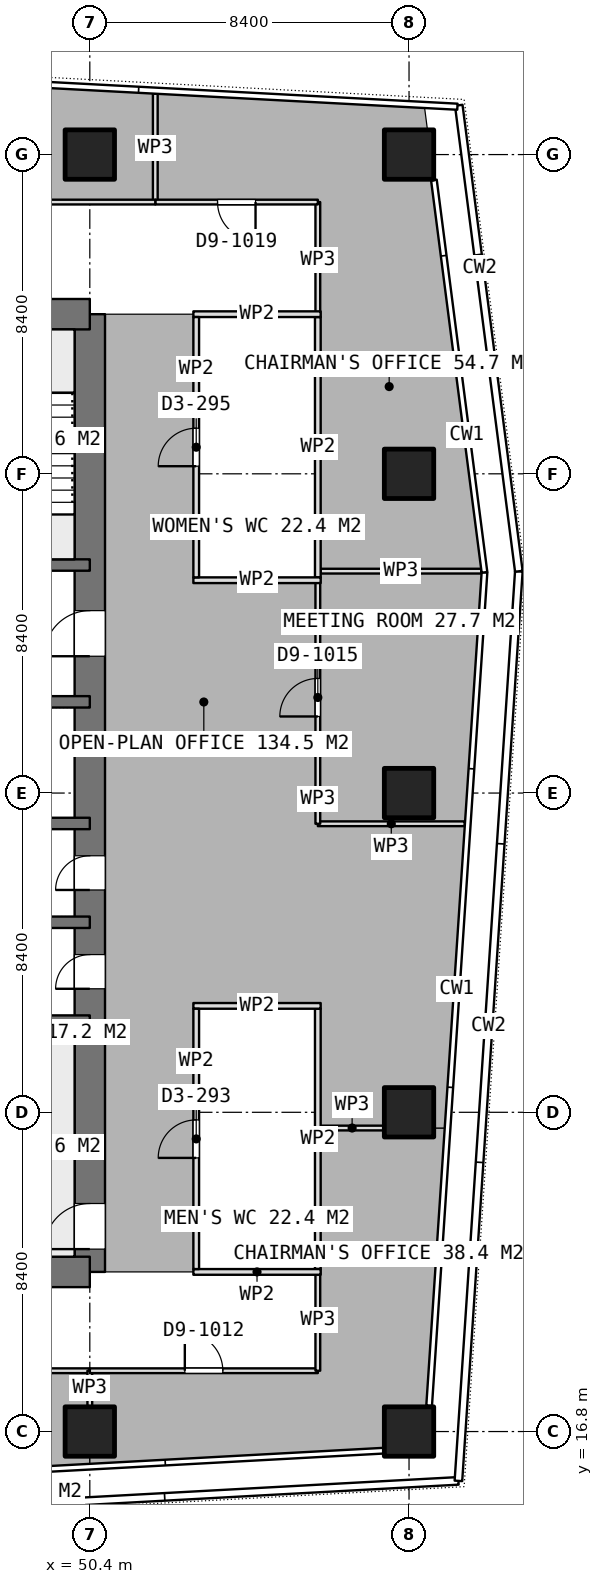
"""IFC4 building model, lengths in metres.
Left out: names, types, materials, properties, quantities, classifications, styles, units other than length and angle.
Written with IfcOpenShell. Run it as: python <this file> out.ifc"""

import sys

from ifc_helpers import new_model, si_unit, direction, frame, frame_2d, origin, origin_2d, place, context, subcontext, project, spatial, rectangle, extrude, element, fill, save


model = new_model("IFC4")
c1 = context("Model", 3, precision=1e-05, world=origin(), true_north=direction((0.0, 1.0)))
c2 = subcontext(c1, "Body", "Model", "MODEL_VIEW")
j1 = project(units=[si_unit("LENGTHUNIT", "METRE"), si_unit("PLANEANGLEUNIT", "RADIAN")], contexts=[c1])
p1 = place(None, origin())
s1 = spatial("IfcSite", under=j1, at=p1, CompositionType="ELEMENT")
p2 = place(p1, origin())
s2 = spatial("IfcBuilding", under=s1, at=p2, CompositionType="ELEMENT")
p3 = place(p2, frame((0.0, 0.0, 272.6)))
s3 = spatial("IfcBuildingStorey", under=s2, at=p3, CompositionType="ELEMENT", Elevation=272.6)
for number, where, z_axis, x_axis in (
    (1, (40.0, 21.0, 0.0), (0.0, 0.0, 1.0), (1.0, 0.0, 0.0)),
    (2, (40.0, 46.2, 0.0), (0.0, 0.0, 1.0), (1.0, 0.0, 0.0)),
):
    element("IfcWall", number, at=place(p3, frame(where, z_axis=z_axis, x_axis=x_axis)), inside=s3, PredefinedType="SHEAR", context=c2, shape_type="SweptSolid", body=[
        extrude(rectangle(XDim=10.4, YDim=0.8, at=frame_2d((5.2, 0.0))), origin(), (0.0, 0.0, 1.0), 3.75),
    ])
p4 = place(p3, frame((50.4, 21.0, 0.0), z_axis=(0.0, 0.0, 1.0), x_axis=(0.0, 1.0, 0.0)))
e3 = element("IfcWall", 3, at=p4, inside=s3, PredefinedType="SHEAR", context=c2, shape_type="SweptSolid", body=[
    extrude(rectangle(XDim=25.2, YDim=0.8, at=frame_2d((12.6, 0.0))), origin(), (0.0, 0.0, 1.0), 3.75),
])
p5 = place(p4, frame((16.2, 0.0, 0.0)))
e4 = element("IfcOpeningElement", 4, at=p5, cuts=e3, PredefinedType="OPENING", context=c2, shape_type="SweptSolid", body=[
    extrude(rectangle(XDim=1.2, YDim=2.1, at=frame_2d((0.6, 1.05))), frame((0.0, 0.41, 0.0), z_axis=(0.0, -1.0, 0.0), x_axis=(1.0, 0.0, 0.0)), (0.0, 0.0, 1.0), 0.82),
])
p6 = place(p4, frame((10.05, 0.0, 0.0)))
e5 = element("IfcOpeningElement", 5, at=p6, cuts=e3, PredefinedType="OPENING", context=c2, shape_type="SweptSolid", body=[
    extrude(rectangle(XDim=0.9, YDim=2.1, at=frame_2d((0.45, 1.05))), frame((0.0, 0.41, 0.0), z_axis=(0.0, -1.0, 0.0), x_axis=(1.0, 0.0, 0.0)), (0.0, 0.0, 1.0), 0.82),
])
p7 = place(p4, frame((7.45, 0.0, 0.0)))
e6 = element("IfcOpeningElement", 6, at=p7, cuts=e3, PredefinedType="OPENING", context=c2, shape_type="SweptSolid", body=[
    extrude(rectangle(XDim=0.9, YDim=2.1, at=frame_2d((0.45, 1.05))), frame((0.0, 0.41, 0.0), z_axis=(0.0, -1.0, 0.0), x_axis=(1.0, 0.0, 0.0)), (0.0, 0.0, 1.0), 0.82),
])
p8 = place(p4, frame((0.6, 0.0, 0.0)))
e7 = element("IfcOpeningElement", 7, at=p8, cuts=e3, PredefinedType="OPENING", context=c2, shape_type="SweptSolid", body=[
    extrude(rectangle(XDim=1.2, YDim=2.1, at=frame_2d((0.6, 1.05))), frame((0.0, 0.41, 0.0), z_axis=(0.0, -1.0, 0.0), x_axis=(1.0, 0.0, 0.0)), (0.0, 0.0, 1.0), 0.82),
])
for number, where, z_axis, x_axis in (
    (8, (43.8, 27.6, 0.0), (0.0, 0.0, 1.0), (1.0, 0.0, 0.0)),
    (9, (43.8, 30.2, 0.0), (0.0, 0.0, 1.0), (1.0, 0.0, 0.0)),
    (10, (43.8, 32.8, 0.0), (0.0, 0.0, 1.0), (1.0, 0.0, 0.0)),
):
    element("IfcWall", number, at=place(p3, frame(where, z_axis=z_axis, x_axis=x_axis)), inside=s3, PredefinedType="SHEAR", context=c2, shape_type="SweptSolid", body=[
        extrude(rectangle(XDim=6.6, YDim=0.3, at=frame_2d((3.3, 0.0))), origin(), (0.0, 0.0, 1.0), 3.75),
    ])
p9 = place(p3, frame((43.8, 36.0, 0.0), z_axis=(0.0, 0.0, 1.0), x_axis=(1.0, 0.0, 0.0)))
e11 = element("IfcWall", 11, at=p9, inside=s3, PredefinedType="SHEAR", context=c2, shape_type="SweptSolid", body=[
    extrude(rectangle(XDim=6.6, YDim=0.3, at=frame_2d((3.3, 0.0))), origin(), (0.0, 0.0, 1.0), 3.75),
])
p10 = place(p9, frame((2.65, 0.0, 0.0)))
e12 = element("IfcOpeningElement", 12, at=p10, cuts=e11, PredefinedType="OPENING", context=c2, shape_type="SweptSolid", body=[
    extrude(rectangle(XDim=1.3, YDim=2.1, at=frame_2d((0.65, 1.05))), frame((0.0, 0.16, 0.0), z_axis=(0.0, -1.0, 0.0), x_axis=(1.0, 0.0, 0.0)), (0.0, 0.0, 1.0), 0.32),
])
p11 = place(p3, frame((43.8, 39.6, 0.0), z_axis=(0.0, 0.0, 1.0), x_axis=(1.0, 0.0, 0.0)))
e13 = element("IfcWall", 13, at=p11, inside=s3, PredefinedType="SHEAR", context=c2, shape_type="SweptSolid", body=[
    extrude(rectangle(XDim=6.6, YDim=0.3, at=frame_2d((3.3, 0.0))), origin(), (0.0, 0.0, 1.0), 3.75),
])
p12 = place(p11, frame((0.35, 0.0, 0.0)))
e14 = element("IfcOpeningElement", 14, at=p12, cuts=e13, PredefinedType="OPENING", context=c2, shape_type="SweptSolid", body=[
    extrude(rectangle(XDim=1.2, YDim=2.1, at=frame_2d((0.6, 1.05))), frame((0.0, 0.16, 0.0), z_axis=(0.0, -1.0, 0.0), x_axis=(1.0, 0.0, 0.0)), (0.0, 0.0, 1.0), 0.32),
])
for number, where, z_axis, x_axis in (
    (15, (50.4, 16.8, 0.0), (0.0, 0.0, 1.0), (1.0, 0.0, 0.0)),
    (16, (50.4, 50.4, 0.0), (0.0, 0.0, 1.0), (1.0, 0.0, 0.0)),
    (17, (58.8, 16.8, 0.0), (0.0, 0.0, 1.0), (1.0, 0.0, 0.0)),
    (18, (58.8, 25.2, 0.0), (0.0, 0.0, 1.0), (1.0, 0.0, 0.0)),
    (19, (58.8, 33.6, 0.0), (0.0, 0.0, 1.0), (1.0, 0.0, 0.0)),
    (20, (58.8, 42.0, 0.0), (0.0, 0.0, 1.0), (1.0, 0.0, 0.0)),
    (21, (58.8, 50.4, 0.0), (0.0, 0.0, 1.0), (1.0, 0.0, 0.0)),
):
    element("IfcColumn", number, at=place(p3, frame(where, z_axis=z_axis, x_axis=x_axis)), inside=s3, PredefinedType="COLUMN", context=c2, shape_type="SweptSolid", body=[
        extrude(rectangle(XDim=1.3, YDim=1.3, at=origin_2d()), origin(), (0.0, 0.0, 1.0), 3.75),
    ])
for number, where, z_axis, x_axis in (
    (22, (53.125, 39.2, 0.0), (0.0, 0.0, 1.0), (1.0, 0.0, 0.0)),
    (23, (53.125, 46.2, 0.0), (0.0, 0.0, 1.0), (1.0, 0.0, 0.0)),
):
    element("IfcWall", number, at=place(p3, frame(where, z_axis=z_axis, x_axis=x_axis)), inside=s3, PredefinedType="PARTITIONING", context=c2, shape_type="SweptSolid", body=[
        extrude(rectangle(XDim=3.35, YDim=0.15, at=frame_2d((1.675, 0.0))), origin(), (0.0, 0.0, 1.0), 3.5),
    ])
p13 = place(p3, frame((53.2, 39.275, 0.0), z_axis=(0.0, 0.0, 1.0), x_axis=(0.0, 1.0, 0.0)))
e24 = element("IfcWall", 24, at=p13, inside=s3, PredefinedType="PARTITIONING", context=c2, shape_type="SweptSolid", body=[
    extrude(rectangle(XDim=6.85, YDim=0.15, at=frame_2d((3.425, 0.0))), origin(), (0.0, 0.0, 1.0), 3.5),
])
p14 = place(p13, frame((2.925, 0.0, 0.0)))
e25 = element("IfcOpeningElement", 25, at=p14, cuts=e24, PredefinedType="OPENING", context=c2, shape_type="SweptSolid", body=[
    extrude(rectangle(XDim=1.0, YDim=2.1, at=frame_2d((0.5, 1.05))), frame((0.0, 0.085, 0.0), z_axis=(0.0, -1.0, 0.0), x_axis=(1.0, 0.0, 0.0)), (0.0, 0.0, 1.0), 0.17),
])
p15 = place(p3, frame((56.4, 39.275, 0.0), z_axis=(0.0, 0.0, 1.0), x_axis=(0.0, 1.0, 0.0)))
e26 = element("IfcWall", 26, at=p15, inside=s3, PredefinedType="PARTITIONING", context=c2, shape_type="SweptSolid", body=[
    extrude(rectangle(XDim=6.85, YDim=0.15, at=frame_2d((3.425, 0.0))), origin(), (0.0, 0.0, 1.0), 3.5),
])
for number, where, z_axis, x_axis in (
    (27, (53.125, 21.0, 0.0), (0.0, 0.0, 1.0), (1.0, 0.0, 0.0)),
    (28, (53.125, 28.0, 0.0), (0.0, 0.0, 1.0), (1.0, 0.0, 0.0)),
):
    element("IfcWall", number, at=place(p3, frame(where, z_axis=z_axis, x_axis=x_axis)), inside=s3, PredefinedType="PARTITIONING", context=c2, shape_type="SweptSolid", body=[
        extrude(rectangle(XDim=3.35, YDim=0.15, at=frame_2d((1.675, 0.0))), origin(), (0.0, 0.0, 1.0), 3.5),
    ])
p16 = place(p3, frame((53.2, 21.075, 0.0), z_axis=(0.0, 0.0, 1.0), x_axis=(0.0, 1.0, 0.0)))
e29 = element("IfcWall", 29, at=p16, inside=s3, PredefinedType="PARTITIONING", context=c2, shape_type="SweptSolid", body=[
    extrude(rectangle(XDim=6.85, YDim=0.15, at=frame_2d((3.425, 0.0))), origin(), (0.0, 0.0, 1.0), 3.5),
])
p17 = place(p16, frame((2.925, 0.0, 0.0)))
e30 = element("IfcOpeningElement", 30, at=p17, cuts=e29, PredefinedType="OPENING", context=c2, shape_type="SweptSolid", body=[
    extrude(rectangle(XDim=1.0, YDim=2.1, at=frame_2d((0.5, 1.05))), frame((0.0, 0.085, 0.0), z_axis=(0.0, -1.0, 0.0), x_axis=(1.0, 0.0, 0.0)), (0.0, 0.0, 1.0), 0.17),
])
p18 = place(p3, frame((56.4, 21.075, 0.0), z_axis=(0.0, 0.0, 1.0), x_axis=(0.0, 1.0, 0.0)))
e31 = element("IfcWall", 31, at=p18, inside=s3, PredefinedType="PARTITIONING", context=c2, shape_type="SweptSolid", body=[
    extrude(rectangle(XDim=6.85, YDim=0.15, at=frame_2d((3.425, 0.0))), origin(), (0.0, 0.0, 1.0), 3.5),
])
p19 = place(p3, frame((60.266, 32.792, 0.0), z_axis=(0.0, 0.0, 1.0), x_axis=(-1.0, 0.0, 0.0)))
e32 = element("IfcWall", 32, at=p19, inside=s3, PredefinedType="PARTITIONING", context=c2, shape_type="SweptSolid", body=[
    extrude(rectangle(XDim=3.866, YDim=0.125, at=frame_2d((1.933, 0.0))), origin(), (0.0, 0.0, 1.0), 3.5),
])
p20 = place(p3, frame((56.4, 32.792, 0.0), z_axis=(0.0, 0.0, 1.0), x_axis=(0.0, 1.0, 0.0)))
e33 = element("IfcWall", 33, at=p20, inside=s3, PredefinedType="PARTITIONING", context=c2, shape_type="SweptSolid", body=[
    extrude(rectangle(XDim=6.482, YDim=0.125, at=frame_2d((3.241, 0.0))), origin(), (0.0, 0.0, 1.0), 3.5),
])
p21 = place(p20, frame((2.823, 0.0, 0.0)))
e34 = element("IfcOpeningElement", 34, at=p21, cuts=e33, PredefinedType="OPENING", context=c2, shape_type="SweptSolid", body=[
    extrude(rectangle(XDim=1.0, YDim=2.1, at=frame_2d((0.5, 1.05))), frame((0.0, 0.073, 0.0), z_axis=(0.0, -1.0, 0.0), x_axis=(1.0, 0.0, 0.0)), (0.0, 0.0, 1.0), 0.145),
])
p22 = place(p3, frame((56.475, 39.439, 0.0), z_axis=(0.0, 0.0, 1.0), x_axis=(1.0, 0.0, 0.0)))
e35 = element("IfcWall", 35, at=p22, inside=s3, PredefinedType="PARTITIONING", context=c2, shape_type="SweptSolid", body=[
    extrude(rectangle(XDim=4.225, YDim=0.125, at=frame_2d((2.112, 0.0))), origin(), (0.0, 0.0, 1.0), 3.5),
])
p23 = place(p3, frame((52.123, 49.15, 0.0), z_axis=(0.0, 0.0, 1.0), x_axis=(0.0, 1.0, 0.0)))
e36 = element("IfcWall", 36, at=p23, inside=s3, PredefinedType="PARTITIONING", context=c2, shape_type="SweptSolid", body=[
    extrude(rectangle(XDim=2.852, YDim=0.125, at=frame_2d((1.426, 0.0))), origin(), (0.0, 0.0, 1.0), 3.5),
])
p24 = place(p3, frame((56.4, 46.125, 0.0), z_axis=(0.0, 0.0, 1.0), x_axis=(0.0, 1.0, 0.0)))
e37 = element("IfcWall", 37, at=p24, inside=s3, PredefinedType="PARTITIONING", context=c2, shape_type="SweptSolid", body=[
    extrude(rectangle(XDim=3.025, YDim=0.125, at=frame_2d((1.512, 0.0))), origin(), (0.0, 0.0, 1.0), 3.5),
])
p25 = place(p3, frame((56.4, 49.15, 0.0), z_axis=(0.0, 0.0, 1.0), x_axis=(-1.0, 0.0, 0.0)))
e38 = element("IfcWall", 38, at=p25, inside=s3, PredefinedType="PARTITIONING", context=c2, shape_type="SweptSolid", body=[
    extrude(rectangle(XDim=4.277, YDim=0.125, at=frame_2d((2.138, 0.0))), origin(), (0.0, 0.0, 1.0), 3.5),
])
p26 = place(p25, frame((1.639, 0.0, 0.0)))
e39 = element("IfcOpeningElement", 39, at=p26, cuts=e38, PredefinedType="OPENING", context=c2, shape_type="SweptSolid", body=[
    extrude(rectangle(XDim=1.0, YDim=2.1, at=frame_2d((0.5, 1.05))), frame((0.0, 0.073, 0.0), z_axis=(0.0, -1.0, 0.0), x_axis=(1.0, 0.0, 0.0)), (0.0, 0.0, 1.0), 0.145),
])
p27 = place(p3, frame((52.123, 49.15, 0.0), z_axis=(0.0, 0.0, 1.0), x_axis=(-1.0, 0.0, 0.0)))
e40 = element("IfcWall", 40, at=p27, inside=s3, PredefinedType="PARTITIONING", context=c2, shape_type="SweptSolid", body=[
    extrude(rectangle(XDim=17.705, YDim=0.125, at=frame_2d((8.853, 0.0))), origin(), (0.0, 0.0, 1.0), 3.5),
])
p28 = place(p27, frame((7.553, 0.0, 0.0)))
e41 = element("IfcOpeningElement", 41, at=p28, cuts=e40, PredefinedType="OPENING", context=c2, shape_type="SweptSolid", body=[
    extrude(rectangle(XDim=1.8, YDim=2.1, at=frame_2d((0.9, 1.05))), frame((0.0, 0.073, 0.0), z_axis=(0.0, -1.0, 0.0), x_axis=(1.0, 0.0, 0.0)), (0.0, 0.0, 1.0), 0.145),
])
p29 = place(p3, frame((42.674, 18.4, 0.0), z_axis=(0.0, 0.0, 1.0), x_axis=(1.0, 0.0, 0.0)))
e42 = element("IfcWall", 42, at=p29, inside=s3, PredefinedType="PARTITIONING", context=c2, shape_type="SweptSolid", body=[
    extrude(rectangle(XDim=7.726, YDim=0.125, at=frame_2d((3.863, 0.0))), origin(), (0.0, 0.0, 1.0), 3.5),
])
p30 = place(p29, frame((3.363, 0.0, 0.0)))
e43 = element("IfcOpeningElement", 43, at=p30, cuts=e42, PredefinedType="OPENING", context=c2, shape_type="SweptSolid", body=[
    extrude(rectangle(XDim=1.0, YDim=2.1, at=frame_2d((0.5, 1.05))), frame((0.0, 0.073, 0.0), z_axis=(0.0, -1.0, 0.0), x_axis=(1.0, 0.0, 0.0)), (0.0, 0.0, 1.0), 0.145),
])
p31 = place(p3, frame((50.4, 18.4, 0.0), z_axis=(0.0, 0.0, 1.0), x_axis=(0.0, -1.0, 0.0)))
e44 = element("IfcWall", 44, at=p31, inside=s3, PredefinedType="PARTITIONING", context=c2, shape_type="SweptSolid", body=[
    extrude(rectangle(XDim=0.93, YDim=0.125, at=frame_2d((0.465, 0.0))), origin(), (0.0, 0.0, 1.0), 3.5),
])
p32 = place(p3, frame((56.475, 24.786, 0.0), z_axis=(0.0, 0.0, 1.0), x_axis=(1.0, 0.0, 0.0)))
e45 = element("IfcWall", 45, at=p32, inside=s3, PredefinedType="PARTITIONING", context=c2, shape_type="SweptSolid", body=[
    extrude(rectangle(XDim=1.655, YDim=0.125, at=frame_2d((0.827, 0.0))), origin(), (0.0, 0.0, 1.0), 3.5),
])
p33 = place(p3, frame((50.401, 18.4, 0.0), z_axis=(0.0, 0.0, 1.0), x_axis=(1.0, 0.0, 0.0)))
e46 = element("IfcWall", 46, at=p33, inside=s3, PredefinedType="PARTITIONING", context=c2, shape_type="SweptSolid", body=[
    extrude(rectangle(XDim=5.999, YDim=0.125, at=frame_2d((3.0, 0.0))), origin(), (0.0, 0.0, 1.0), 3.5),
])
p34 = place(p33, frame((2.499, 0.0, 0.0)))
e47 = element("IfcOpeningElement", 47, at=p34, cuts=e46, PredefinedType="OPENING", context=c2, shape_type="SweptSolid", body=[
    extrude(rectangle(XDim=1.0, YDim=2.1, at=frame_2d((0.5, 1.05))), frame((0.0, 0.073, 0.0), z_axis=(0.0, -1.0, 0.0), x_axis=(1.0, 0.0, 0.0)), (0.0, 0.0, 1.0), 0.145),
])
p35 = place(p3, frame((56.4, 18.4, 0.0), z_axis=(0.0, 0.0, 1.0), x_axis=(0.0, 1.0, 0.0)))
e48 = element("IfcWall", 48, at=p35, inside=s3, PredefinedType="PARTITIONING", context=c2, shape_type="SweptSolid", body=[
    extrude(rectangle(XDim=2.675, YDim=0.125, at=frame_2d((1.337, 0.0))), origin(), (0.0, 0.0, 1.0), 3.5),
])
p36 = place(p5, origin())
e49 = element("IfcDoor", 49, at=p36, inside=s3, OperationType="SINGLE_SWING_LEFT", PredefinedType="DOOR", context=c2, shape_type="SweptSolid", body=[
    extrude(rectangle(XDim=1.2, YDim=2.1, at=frame_2d((0.6, 1.05))), frame((0.0, 0.025, 0.0), z_axis=(0.0, -1.0, 0.0), x_axis=(1.0, 0.0, 0.0)), (0.0, 0.0, 1.0), 0.05),
])
fill(e4, e49)
p37 = place(p6, origin())
e50 = element("IfcDoor", 50, at=p37, inside=s3, OperationType="SINGLE_SWING_LEFT", PredefinedType="DOOR", context=c2, shape_type="SweptSolid", body=[
    extrude(rectangle(XDim=0.9, YDim=2.1, at=frame_2d((0.45, 1.05))), frame((0.0, 0.025, 0.0), z_axis=(0.0, -1.0, 0.0), x_axis=(1.0, 0.0, 0.0)), (0.0, 0.0, 1.0), 0.05),
])
fill(e5, e50)
p38 = place(p7, origin())
e51 = element("IfcDoor", 51, at=p38, inside=s3, OperationType="SINGLE_SWING_LEFT", PredefinedType="DOOR", context=c2, shape_type="SweptSolid", body=[
    extrude(rectangle(XDim=0.9, YDim=2.1, at=frame_2d((0.45, 1.05))), frame((0.0, 0.025, 0.0), z_axis=(0.0, -1.0, 0.0), x_axis=(1.0, 0.0, 0.0)), (0.0, 0.0, 1.0), 0.05),
])
fill(e6, e51)
p39 = place(p14, origin())
e52 = element("IfcDoor", 52, at=p39, inside=s3, OperationType="SINGLE_SWING_LEFT", PredefinedType="DOOR", context=c2, shape_type="SweptSolid", body=[
    extrude(rectangle(XDim=1.0, YDim=2.1, at=frame_2d((0.5, 1.05))), frame((0.0, 0.025, 0.0), z_axis=(0.0, -1.0, 0.0), x_axis=(1.0, 0.0, 0.0)), (0.0, 0.0, 1.0), 0.05),
])
fill(e25, e52)
p40 = place(p17, origin())
e53 = element("IfcDoor", 53, at=p40, inside=s3, OperationType="SINGLE_SWING_LEFT", PredefinedType="DOOR", context=c2, shape_type="SweptSolid", body=[
    extrude(rectangle(XDim=1.0, YDim=2.1, at=frame_2d((0.5, 1.05))), frame((0.0, 0.025, 0.0), z_axis=(0.0, -1.0, 0.0), x_axis=(1.0, 0.0, 0.0)), (0.0, 0.0, 1.0), 0.05),
])
fill(e30, e53)
p41 = place(p21, origin())
e54 = element("IfcDoor", 54, at=p41, inside=s3, OperationType="SINGLE_SWING_LEFT", PredefinedType="DOOR", context=c2, shape_type="SweptSolid", body=[
    extrude(rectangle(XDim=1.0, YDim=2.1, at=frame_2d((0.5, 1.05))), frame((0.0, 0.025, 0.0), z_axis=(0.0, -1.0, 0.0), x_axis=(1.0, 0.0, 0.0)), (0.0, 0.0, 1.0), 0.05),
])
fill(e34, e54)
p42 = place(p26, origin())
e55 = element("IfcDoor", 55, at=p42, inside=s3, OperationType="SINGLE_SWING_LEFT", PredefinedType="DOOR", context=c2, shape_type="SweptSolid", body=[
    extrude(rectangle(XDim=1.0, YDim=2.1, at=frame_2d((0.5, 1.05))), frame((0.0, 0.025, 0.0), z_axis=(0.0, -1.0, 0.0), x_axis=(1.0, 0.0, 0.0)), (0.0, 0.0, 1.0), 0.05),
])
fill(e39, e55)
p43 = place(p34, origin())
e56 = element("IfcDoor", 56, at=p43, inside=s3, OperationType="SINGLE_SWING_LEFT", PredefinedType="DOOR", context=c2, shape_type="SweptSolid", body=[
    extrude(rectangle(XDim=1.0, YDim=2.1, at=frame_2d((0.5, 1.05))), frame((0.0, 0.025, 0.0), z_axis=(0.0, -1.0, 0.0), x_axis=(1.0, 0.0, 0.0)), (0.0, 0.0, 1.0), 0.05),
])
fill(e47, e56)
p44 = place(p8, origin())
e57 = element("IfcDoor", 57, at=p44, inside=s3, OperationType="SINGLE_SWING_RIGHT", PredefinedType="DOOR", context=c2, shape_type="SweptSolid", body=[
    extrude(rectangle(XDim=1.2, YDim=2.1, at=frame_2d((0.6, 1.05))), frame((0.0, 0.025, 0.0), z_axis=(0.0, -1.0, 0.0), x_axis=(1.0, 0.0, 0.0)), (0.0, 0.0, 1.0), 0.05),
])
fill(e7, e57)
save(model, sys.argv[1])
